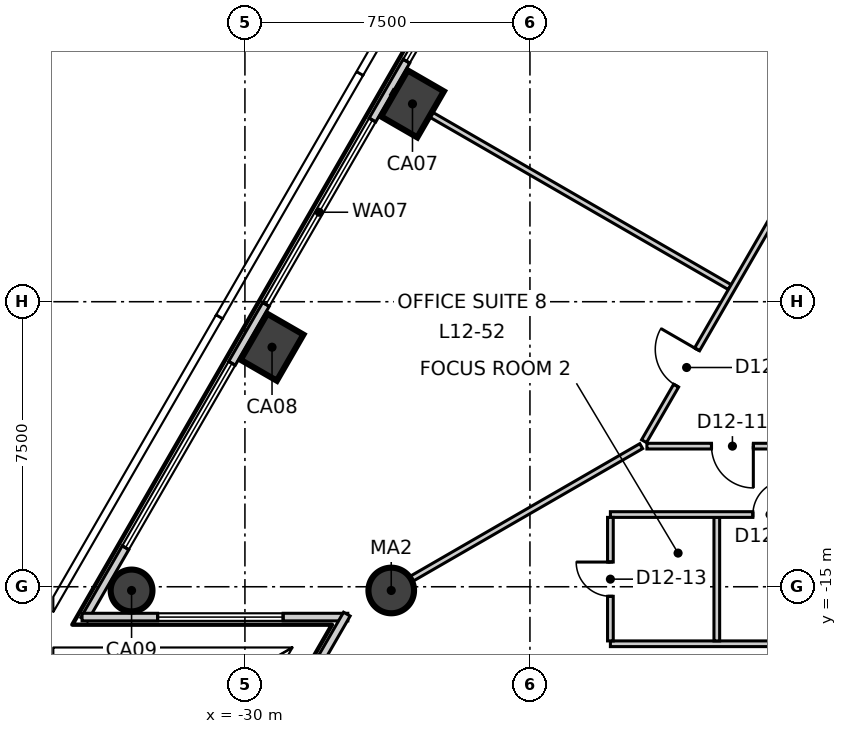
"""IFC4 building model, lengths in metres.
Left out: names, types, materials, properties, quantities, classifications, styles, units other than length and angle.
Written with IfcOpenShell. Run it as: python <this file> out.ifc"""

import sys

from ifc_helpers import new_model, si_unit, direction, frame, frame_2d, origin, origin_2d, place, context, subcontext, project, spatial, rectangle, circle, extrude, element, fill, save


model = new_model("IFC4")
c1 = context("Model", 3, precision=1e-05, world=origin(), true_north=direction((0.0, 1.0)))
c2 = subcontext(c1, "Body", "Model", "MODEL_VIEW")
j1 = project(units=[si_unit("LENGTHUNIT", "METRE"), si_unit("PLANEANGLEUNIT", "RADIAN")], contexts=[c1])
p1 = place(None, origin())
s1 = spatial("IfcSite", under=j1, at=p1, CompositionType="ELEMENT")
p2 = place(p1, origin())
s2 = spatial("IfcBuilding", under=s1, at=p2, CompositionType="ELEMENT")
p3 = place(p2, frame((0.0, 0.0, 59.3)))
s3 = spatial("IfcBuildingStorey", under=s2, at=p3, CompositionType="ELEMENT", Elevation=59.3)
for number, where, z_axis, x_axis in (
    (1, (-25.591, -2.295, -0.3), (0.0, 0.0, 1.0), (0.5, 0.866, 0.0)),
    (2, (-29.287, -8.697, -0.3), (0.0, 0.0, 1.0), (0.5, 0.866, 0.0)),
):
    element("IfcColumn", number, at=place(p3, frame(where, z_axis=z_axis, x_axis=x_axis)), inside=s3, PredefinedType="COLUMN", context=c2, shape_type="SweptSolid", body=[
        extrude(rectangle(XDim=1.4, YDim=1.1, at=origin_2d()), origin(), (0.0, 0.0, 1.0), 4.0),
    ])
p4 = place(p3, frame((-32.983, -15.098, -0.3), z_axis=(0.0, 0.0, 1.0), x_axis=(0.5, 0.866025403784, 0.0)))
e3 = element("IfcColumn", 3, at=p4, inside=s3, PredefinedType="COLUMN", context=c2, shape_type="SweptSolid", body=[
    extrude(circle(Radius=0.55, at=origin_2d()), origin(), (0.0, 0.0, 1.0), 4.0),
])
p5 = place(p3, frame((-26.15, -15.098, -0.3), z_axis=(0.0, 0.0, 1.0), x_axis=(1.0, 0.0, 0.0)))
e4 = element("IfcColumn", 4, at=p5, inside=s3, PredefinedType="COLUMN", context=c2, shape_type="SweptSolid", body=[
    extrude(circle(Radius=0.6, at=origin_2d()), origin(), (0.0, 0.0, 1.0), 4.0),
])
p6 = place(p3, frame((-3.371, 37.591, 0.0), z_axis=(0.0, 0.0, 1.0), x_axis=(-0.500006313899, -0.866021758423, 0.0)))
e5 = element("IfcWall", 5, at=p6, inside=s3, PredefinedType="ELEMENTEDWALL", context=c2, shape_type="SweptSolid", body=[
    extrude(rectangle(XDim=61.719, YDim=0.2, at=frame_2d((30.859, 0.0))), origin(), (0.0, 0.0, 1.0), 3.7),
])
p7 = place(p6, frame((2.198, 0.0, 0.9)))
e6 = element("IfcOpeningElement", 6, at=p7, cuts=e5, PredefinedType="OPENING", context=c2, shape_type="SweptSolid", body=[
    extrude(rectangle(XDim=5.6, YDim=2.5, at=frame_2d((2.8, 1.25))), frame((0.0, 0.11, 0.0), z_axis=(0.0, -1.0, 0.0), x_axis=(1.0, 0.0, 0.0)), (0.0, 0.0, 1.0), 0.22),
])
p8 = place(p6, frame((9.59, 0.0, 0.9)))
e7 = element("IfcOpeningElement", 7, at=p8, cuts=e5, PredefinedType="OPENING", context=c2, shape_type="SweptSolid", body=[
    extrude(rectangle(XDim=5.6, YDim=2.5, at=frame_2d((2.8, 1.25))), frame((0.0, 0.11, 0.0), z_axis=(0.0, -1.0, 0.0), x_axis=(1.0, 0.0, 0.0)), (0.0, 0.0, 1.0), 0.22),
])
p9 = place(p6, frame((16.982, 0.0, 0.9)))
e8 = element("IfcOpeningElement", 8, at=p9, cuts=e5, PredefinedType="OPENING", context=c2, shape_type="SweptSolid", body=[
    extrude(rectangle(XDim=5.6, YDim=2.5, at=frame_2d((2.8, 1.25))), frame((0.0, 0.11, 0.0), z_axis=(0.0, -1.0, 0.0), x_axis=(1.0, 0.0, 0.0)), (0.0, 0.0, 1.0), 0.22),
])
p10 = place(p6, frame((24.373, 0.0, 0.9)))
e9 = element("IfcOpeningElement", 9, at=p10, cuts=e5, PredefinedType="OPENING", context=c2, shape_type="SweptSolid", body=[
    extrude(rectangle(XDim=5.6, YDim=2.5, at=frame_2d((2.8, 1.25))), frame((0.0, 0.11, 0.0), z_axis=(0.0, -1.0, 0.0), x_axis=(1.0, 0.0, 0.0)), (0.0, 0.0, 1.0), 0.22),
])
p11 = place(p6, frame((31.765, 0.0, 0.9)))
e10 = element("IfcOpeningElement", 10, at=p11, cuts=e5, PredefinedType="OPENING", context=c2, shape_type="SweptSolid", body=[
    extrude(rectangle(XDim=5.6, YDim=2.5, at=frame_2d((2.8, 1.25))), frame((0.0, 0.11, 0.0), z_axis=(0.0, -1.0, 0.0), x_axis=(1.0, 0.0, 0.0)), (0.0, 0.0, 1.0), 0.22),
])
p12 = place(p6, frame((39.157, 0.0, 0.9)))
e11 = element("IfcOpeningElement", 11, at=p12, cuts=e5, PredefinedType="OPENING", context=c2, shape_type="SweptSolid", body=[
    extrude(rectangle(XDim=5.6, YDim=2.5, at=frame_2d((2.8, 1.25))), frame((0.0, 0.11, 0.0), z_axis=(0.0, -1.0, 0.0), x_axis=(1.0, 0.0, 0.0)), (0.0, 0.0, 1.0), 0.22),
])
p13 = place(p6, frame((46.548, 0.0, 0.9)))
e12 = element("IfcOpeningElement", 12, at=p13, cuts=e5, PredefinedType="OPENING", context=c2, shape_type="SweptSolid", body=[
    extrude(rectangle(XDim=5.6, YDim=2.5, at=frame_2d((2.8, 1.25))), frame((0.0, 0.11, 0.0), z_axis=(0.0, -1.0, 0.0), x_axis=(1.0, 0.0, 0.0)), (0.0, 0.0, 1.0), 0.22),
])
p14 = place(p6, frame((53.94, 0.0, 0.9)))
e13 = element("IfcOpeningElement", 13, at=p14, cuts=e5, PredefinedType="OPENING", context=c2, shape_type="SweptSolid", body=[
    extrude(rectangle(XDim=5.6, YDim=2.5, at=frame_2d((2.8, 1.25))), frame((0.0, 0.11, 0.0), z_axis=(0.0, -1.0, 0.0), x_axis=(1.0, 0.0, 0.0)), (0.0, 0.0, 1.0), 0.22),
])
p15 = place(p3, frame((-34.286, -15.798, 0.0), z_axis=(0.0, 0.0, 1.0), x_axis=(1.0, 0.0, 0.0)))
e14 = element("IfcWall", 14, at=p15, inside=s3, PredefinedType="ELEMENTEDWALL", context=c2, shape_type="SweptSolid", body=[
    extrude(rectangle(XDim=6.993, YDim=0.2, at=frame_2d((3.497, 0.0))), origin(), (0.0, 0.0, 1.0), 3.7),
])
p16 = place(p15, frame((1.99, 0.0, 0.9)))
e15 = element("IfcOpeningElement", 15, at=p16, cuts=e14, PredefinedType="OPENING", context=c2, shape_type="SweptSolid", body=[
    extrude(rectangle(XDim=3.3, YDim=2.5, at=frame_2d((1.65, 1.25))), frame((0.0, 0.11, 0.0), z_axis=(0.0, -1.0, 0.0), x_axis=(1.0, 0.0, 0.0)), (0.0, 0.0, 1.0), 0.22),
])
p17 = place(p3, frame((-27.318, -15.72, 0.0), z_axis=(0.0, 0.0, 1.0), x_axis=(-0.499943085557, -0.86605826086, 0.0)))
e16 = element("IfcWall", 16, at=p17, inside=s3, PredefinedType="ELEMENTEDWALL", context=c2, shape_type="SweptSolid", body=[
    extrude(rectangle(XDim=6.992, YDim=0.2, at=frame_2d((3.496, 0.0))), origin(), (0.0, 0.0, 1.0), 3.7),
])
p18 = place(p17, frame((1.39, 0.0, 0.9)))
e17 = element("IfcOpeningElement", 17, at=p18, cuts=e16, PredefinedType="OPENING", context=c2, shape_type="SweptSolid", body=[
    extrude(rectangle(XDim=3.3, YDim=2.5, at=frame_2d((1.65, 1.25))), frame((0.0, 0.11, 0.0), z_axis=(0.0, -1.0, 0.0), x_axis=(1.0, 0.0, 0.0)), (0.0, 0.0, 1.0), 0.22),
])
p19 = place(p3, frame((-26.687, -15.408, 0.0), z_axis=(0.0, 0.0, 1.0), x_axis=(0.866021786635, 0.500006265035, 0.0)))
e18 = element("IfcWall", 18, at=p19, inside=s3, PredefinedType="PARTITIONING", context=c2, shape_type="SweptSolid", body=[
    extrude(rectangle(XDim=8.216, YDim=0.15, at=frame_2d((4.108, 0.0))), origin(), (0.0, 0.0, 1.0), 3.1),
])
p20 = place(p3, frame((-26.128, -1.985, 0.0), z_axis=(0.0, 0.0, 1.0), x_axis=(0.866020337685, -0.500008774639, 0.0)))
e19 = element("IfcWall", 19, at=p20, inside=s3, PredefinedType="PARTITIONING", context=c2, shape_type="SweptSolid", body=[
    extrude(rectangle(XDim=10.26, YDim=0.15, at=frame_2d((5.13, 0.0))), origin(), (0.0, 0.0, 1.0), 3.7),
])
p21 = place(p3, frame((-19.497, -11.17, 0.0), z_axis=(0.0, 0.0, 1.0), x_axis=(0.499998854553, 0.866026065108, 0.0)))
e20 = element("IfcWall", 20, at=p21, inside=s3, PredefinedType="PARTITIONING", context=c2, shape_type="SweptSolid", body=[
    extrude(rectangle(XDim=38.994, YDim=0.15, at=frame_2d((19.497, 0.0))), origin(), (0.0, 0.0, 1.0), 3.7),
])
p22 = place(p21, frame((36.044, 0.0, 0.0)))
e21 = element("IfcOpeningElement", 21, at=p22, cuts=e20, PredefinedType="OPENING", context=c2, shape_type="SweptSolid", body=[
    extrude(rectangle(XDim=1.1, YDim=2.1, at=frame_2d((0.55, 1.05))), frame((0.0, 0.085, 0.0), z_axis=(0.0, -1.0, 0.0), x_axis=(1.0, 0.0, 0.0)), (0.0, 0.0, 1.0), 0.17),
])
p23 = place(p21, frame((21.855, 0.0, 0.0)))
e22 = element("IfcOpeningElement", 22, at=p23, cuts=e20, PredefinedType="OPENING", context=c2, shape_type="SweptSolid", body=[
    extrude(rectangle(XDim=1.1, YDim=2.1, at=frame_2d((0.55, 1.05))), frame((0.0, 0.085, 0.0), z_axis=(0.0, -1.0, 0.0), x_axis=(1.0, 0.0, 0.0)), (0.0, 0.0, 1.0), 0.17),
])
p24 = place(p21, frame((32.155, 0.0, 0.0)))
e23 = element("IfcOpeningElement", 23, at=p24, cuts=e20, PredefinedType="OPENING", context=c2, shape_type="SweptSolid", body=[
    extrude(rectangle(XDim=0.9, YDim=2.1, at=frame_2d((0.45, 1.05))), frame((0.0, 0.085, 0.0), z_axis=(0.0, -1.0, 0.0), x_axis=(1.0, 0.0, 0.0)), (0.0, 0.0, 1.0), 0.17),
])
p25 = place(p21, frame((28.955, 0.0, 0.0)))
e24 = element("IfcOpeningElement", 24, at=p25, cuts=e20, PredefinedType="OPENING", context=c2, shape_type="SweptSolid", body=[
    extrude(rectangle(XDim=0.9, YDim=2.1, at=frame_2d((0.45, 1.05))), frame((0.0, 0.085, 0.0), z_axis=(0.0, -1.0, 0.0), x_axis=(1.0, 0.0, 0.0)), (0.0, 0.0, 1.0), 0.17),
])
p26 = place(p21, frame((26.055, 0.0, 0.0)))
e25 = element("IfcOpeningElement", 25, at=p26, cuts=e20, PredefinedType="OPENING", context=c2, shape_type="SweptSolid", body=[
    extrude(rectangle(XDim=1.0, YDim=2.1, at=frame_2d((0.5, 1.05))), frame((0.0, 0.085, 0.0), z_axis=(0.0, -1.0, 0.0), x_axis=(1.0, 0.0, 0.0)), (0.0, 0.0, 1.0), 0.17),
])
p27 = place(p21, frame((10.373, 0.0, 0.0)))
e26 = element("IfcOpeningElement", 26, at=p27, cuts=e20, PredefinedType="OPENING", context=c2, shape_type="SweptSolid", body=[
    extrude(rectangle(XDim=1.0, YDim=2.1, at=frame_2d((0.5, 1.05))), frame((0.0, 0.085, 0.0), z_axis=(0.0, -1.0, 0.0), x_axis=(1.0, 0.0, 0.0)), (0.0, 0.0, 1.0), 0.17),
])
p28 = place(p21, frame((17.773, 0.0, 0.0)))
e27 = element("IfcOpeningElement", 27, at=p28, cuts=e20, PredefinedType="OPENING", context=c2, shape_type="SweptSolid", body=[
    extrude(rectangle(XDim=0.9, YDim=2.1, at=frame_2d((0.45, 1.05))), frame((0.0, 0.085, 0.0), z_axis=(0.0, -1.0, 0.0), x_axis=(1.0, 0.0, 0.0)), (0.0, 0.0, 1.0), 0.17),
])
p29 = place(p21, frame((1.689, 0.0, 0.0)))
e28 = element("IfcOpeningElement", 28, at=p29, cuts=e20, PredefinedType="OPENING", context=c2, shape_type="SweptSolid", body=[
    extrude(rectangle(XDim=1.1, YDim=2.1, at=frame_2d((0.55, 1.05))), frame((0.0, 0.085, 0.0), z_axis=(0.0, -1.0, 0.0), x_axis=(1.0, 0.0, 0.0)), (0.0, 0.0, 1.0), 0.17),
])
p30 = place(p3, frame((-19.422, -11.3, 0.0), z_axis=(0.0, 0.0, 1.0), x_axis=(1.0, 0.0, 0.0)))
e29 = element("IfcWall", 29, at=p30, inside=s3, PredefinedType="PARTITIONING", context=c2, shape_type="SweptSolid", body=[
    extrude(rectangle(XDim=38.994, YDim=0.15, at=frame_2d((19.497, 0.0))), origin(), (0.0, 0.0, 1.0), 3.7),
])
p31 = place(p30, frame((1.7, 0.0, 0.0)))
e30 = element("IfcOpeningElement", 30, at=p31, cuts=e29, PredefinedType="OPENING", context=c2, shape_type="SweptSolid", body=[
    extrude(rectangle(XDim=1.1, YDim=2.1, at=frame_2d((0.55, 1.05))), frame((0.0, 0.085, 0.0), z_axis=(0.0, -1.0, 0.0), x_axis=(1.0, 0.0, 0.0)), (0.0, 0.0, 1.0), 0.17),
])
p32 = place(p30, frame((12.889, 0.0, 0.0)))
e31 = element("IfcOpeningElement", 31, at=p32, cuts=e29, PredefinedType="OPENING", context=c2, shape_type="SweptSolid", body=[
    extrude(rectangle(XDim=1.0, YDim=2.1, at=frame_2d((0.5, 1.05))), frame((0.0, 0.085, 0.0), z_axis=(0.0, -1.0, 0.0), x_axis=(1.0, 0.0, 0.0)), (0.0, 0.0, 1.0), 0.17),
])
p33 = place(p30, frame((5.589, 0.0, 0.0)))
e32 = element("IfcOpeningElement", 32, at=p33, cuts=e29, PredefinedType="OPENING", context=c2, shape_type="SweptSolid", body=[
    extrude(rectangle(XDim=0.9, YDim=2.1, at=frame_2d((0.45, 1.05))), frame((0.0, 0.085, 0.0), z_axis=(0.0, -1.0, 0.0), x_axis=(1.0, 0.0, 0.0)), (0.0, 0.0, 1.0), 0.17),
])
p34 = place(p30, frame((29.272, 0.0, 0.0)))
e33 = element("IfcOpeningElement", 33, at=p34, cuts=e29, PredefinedType="OPENING", context=c2, shape_type="SweptSolid", body=[
    extrude(rectangle(XDim=1.1, YDim=2.1, at=frame_2d((0.55, 1.05))), frame((0.0, 0.085, 0.0), z_axis=(0.0, -1.0, 0.0), x_axis=(1.0, 0.0, 0.0)), (0.0, 0.0, 1.0), 0.17),
])
p35 = place(p30, frame((20.772, 0.0, 0.0)))
e34 = element("IfcOpeningElement", 34, at=p35, cuts=e29, PredefinedType="OPENING", context=c2, shape_type="SweptSolid", body=[
    extrude(rectangle(XDim=0.9, YDim=2.1, at=frame_2d((0.45, 1.05))), frame((0.0, 0.085, 0.0), z_axis=(0.0, -1.0, 0.0), x_axis=(1.0, 0.0, 0.0)), (0.0, 0.0, 1.0), 0.17),
])
p36 = place(p30, frame((23.772, 0.0, 0.0)))
e35 = element("IfcOpeningElement", 35, at=p36, cuts=e29, PredefinedType="OPENING", context=c2, shape_type="SweptSolid", body=[
    extrude(rectangle(XDim=0.9, YDim=2.1, at=frame_2d((0.45, 1.05))), frame((0.0, 0.085, 0.0), z_axis=(0.0, -1.0, 0.0), x_axis=(1.0, 0.0, 0.0)), (0.0, 0.0, 1.0), 0.17),
])
p37 = place(p30, frame((36.055, 0.0, 0.0)))
e36 = element("IfcOpeningElement", 36, at=p37, cuts=e29, PredefinedType="OPENING", context=c2, shape_type="SweptSolid", body=[
    extrude(rectangle(XDim=1.1, YDim=2.1, at=frame_2d((0.55, 1.05))), frame((0.0, 0.085, 0.0), z_axis=(0.0, -1.0, 0.0), x_axis=(1.0, 0.0, 0.0)), (0.0, 0.0, 1.0), 0.17),
])
p38 = place(p3, frame((-20.383, -16.5, 0.0), z_axis=(0.0, 0.0, 1.0), x_axis=(1.0, 0.0, 0.0)))
e37 = element("IfcWall", 37, at=p38, inside=s3, PredefinedType="PARTITIONING", context=c2, shape_type="SweptSolid", body=[
    extrude(rectangle(XDim=5.525, YDim=0.15, at=frame_2d((2.763, 0.0))), origin(), (0.0, 0.0, 1.0), 3.7),
])
p39 = place(p3, frame((-17.583, -16.425, 0.0), z_axis=(0.0, 0.0, 1.0), x_axis=(0.0, 1.0, 0.0)))
e38 = element("IfcWall", 38, at=p39, inside=s3, PredefinedType="PARTITIONING", context=c2, shape_type="SweptSolid", body=[
    extrude(rectangle(XDim=3.25, YDim=0.15, at=frame_2d((1.625, 0.0))), origin(), (0.0, 0.0, 1.0), 3.7),
])
p40 = place(p3, frame((-20.383, -13.1, 0.0), z_axis=(0.0, 0.0, 1.0), x_axis=(1.0, 0.0, 0.0)))
e39 = element("IfcWall", 39, at=p40, inside=s3, PredefinedType="PARTITIONING", context=c2, shape_type="SweptSolid", body=[
    extrude(rectangle(XDim=5.525, YDim=0.15, at=frame_2d((2.763, 0.0))), origin(), (0.0, 0.0, 1.0), 3.7),
])
p41 = place(p40, frame((3.75, 0.0, 0.0)))
e40 = element("IfcOpeningElement", 40, at=p41, cuts=e39, PredefinedType="OPENING", context=c2, shape_type="SweptSolid", body=[
    extrude(rectangle(XDim=0.9, YDim=2.1, at=frame_2d((0.45, 1.05))), frame((0.0, 0.085, 0.0), z_axis=(0.0, -1.0, 0.0), x_axis=(1.0, 0.0, 0.0)), (0.0, 0.0, 1.0), 0.17),
])
p42 = place(p3, frame((-20.383, -16.425, 0.0), z_axis=(0.0, 0.0, 1.0), x_axis=(0.0, 1.0, 0.0)))
e41 = element("IfcWall", 41, at=p42, inside=s3, PredefinedType="PARTITIONING", context=c2, shape_type="SweptSolid", body=[
    extrude(rectangle(XDim=3.25, YDim=0.15, at=frame_2d((1.625, 0.0))), origin(), (0.0, 0.0, 1.0), 3.7),
])
p43 = place(p42, frame((1.175, 0.0, 0.0)))
e42 = element("IfcOpeningElement", 42, at=p43, cuts=e41, PredefinedType="OPENING", context=c2, shape_type="SweptSolid", body=[
    extrude(rectangle(XDim=0.9, YDim=2.1, at=frame_2d((0.45, 1.05))), frame((0.0, 0.085, 0.0), z_axis=(0.0, -1.0, 0.0), x_axis=(1.0, 0.0, 0.0)), (0.0, 0.0, 1.0), 0.17),
])
p44 = place(p12, origin())
e43 = element("IfcWindow", 43, at=p44, inside=s3, PartitioningType="SINGLE_PANEL", PredefinedType="WINDOW", context=c2, shape_type="SweptSolid", body=[
    extrude(rectangle(XDim=5.6, YDim=2.5, at=frame_2d((2.8, 1.25))), frame((0.0, 0.03, 0.0), z_axis=(0.0, -1.0, 0.0), x_axis=(1.0, 0.0, 0.0)), (0.0, 0.0, 1.0), 0.06),
])
fill(e11, e43)
p45 = place(p13, origin())
e44 = element("IfcWindow", 44, at=p45, inside=s3, PartitioningType="SINGLE_PANEL", PredefinedType="WINDOW", context=c2, shape_type="SweptSolid", body=[
    extrude(rectangle(XDim=5.6, YDim=2.5, at=frame_2d((2.8, 1.25))), frame((0.0, 0.03, 0.0), z_axis=(0.0, -1.0, 0.0), x_axis=(1.0, 0.0, 0.0)), (0.0, 0.0, 1.0), 0.06),
])
fill(e12, e44)
p46 = place(p14, origin())
e45 = element("IfcWindow", 45, at=p46, inside=s3, PartitioningType="SINGLE_PANEL", PredefinedType="WINDOW", context=c2, shape_type="SweptSolid", body=[
    extrude(rectangle(XDim=5.6, YDim=2.5, at=frame_2d((2.8, 1.25))), frame((0.0, 0.03, 0.0), z_axis=(0.0, -1.0, 0.0), x_axis=(1.0, 0.0, 0.0)), (0.0, 0.0, 1.0), 0.06),
])
fill(e13, e45)
p47 = place(p16, origin())
e46 = element("IfcWindow", 46, at=p47, inside=s3, PartitioningType="SINGLE_PANEL", PredefinedType="WINDOW", context=c2, shape_type="SweptSolid", body=[
    extrude(rectangle(XDim=3.3, YDim=2.5, at=frame_2d((1.65, 1.25))), frame((0.0, 0.03, 0.0), z_axis=(0.0, -1.0, 0.0), x_axis=(1.0, 0.0, 0.0)), (0.0, 0.0, 1.0), 0.06),
])
fill(e15, e46)
p48 = place(p31, origin())
e47 = element("IfcDoor", 47, at=p48, inside=s3, OperationType="SINGLE_SWING_RIGHT", PredefinedType="DOOR", context=c2, shape_type="SweptSolid", body=[
    extrude(rectangle(XDim=1.1, YDim=2.1, at=frame_2d((0.55, 1.05))), frame((0.0, 0.025, 0.0), z_axis=(0.0, -1.0, 0.0), x_axis=(1.0, 0.0, 0.0)), (0.0, 0.0, 1.0), 0.05),
])
fill(e30, e47)
p49 = place(p41, origin())
e48 = element("IfcDoor", 48, at=p49, inside=s3, OperationType="SINGLE_SWING_LEFT", PredefinedType="DOOR", context=c2, shape_type="SweptSolid", body=[
    extrude(rectangle(XDim=0.9, YDim=2.1, at=frame_2d((0.45, 1.05))), frame((0.0, 0.025, 0.0), z_axis=(0.0, -1.0, 0.0), x_axis=(1.0, 0.0, 0.0)), (0.0, 0.0, 1.0), 0.05),
])
fill(e40, e48)
p50 = place(p43, origin())
e49 = element("IfcDoor", 49, at=p50, inside=s3, OperationType="SINGLE_SWING_LEFT", PredefinedType="DOOR", context=c2, shape_type="SweptSolid", body=[
    extrude(rectangle(XDim=0.9, YDim=2.1, at=frame_2d((0.45, 1.05))), frame((0.0, 0.025, 0.0), z_axis=(0.0, -1.0, 0.0), x_axis=(1.0, 0.0, 0.0)), (0.0, 0.0, 1.0), 0.05),
])
fill(e42, e49)
p51 = place(p29, origin())
e50 = element("IfcDoor", 50, at=p51, inside=s3, OperationType="SINGLE_SWING_LEFT", PredefinedType="DOOR", context=c2, shape_type="SweptSolid", body=[
    extrude(rectangle(XDim=1.1, YDim=2.1, at=frame_2d((0.55, 1.05))), frame((0.0, 0.025, 0.0), z_axis=(0.0, -1.0, 0.0), x_axis=(1.0, 0.0, 0.0)), (0.0, 0.0, 1.0), 0.05),
])
fill(e28, e50)
save(model, sys.argv[1])
